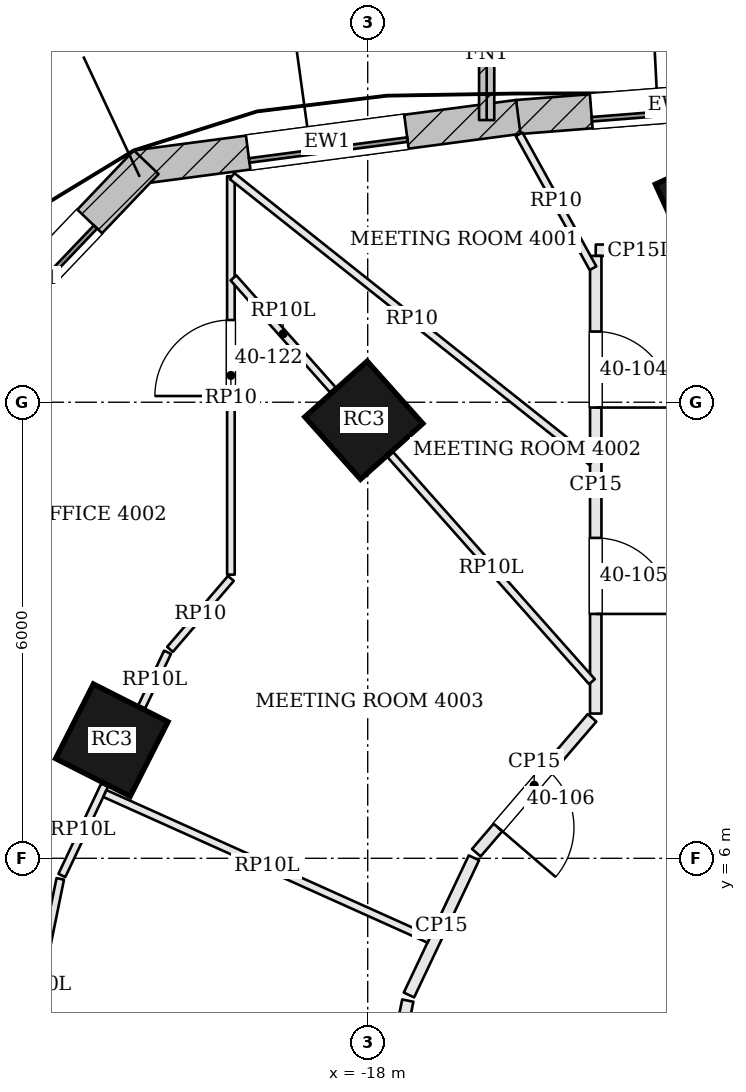
"""IFC4 building model, lengths in metres.
Left out: names, types, materials, properties, quantities, classifications, styles, units other than length and angle.
Written with IfcOpenShell. Run it as: python <this file> out.ifc"""

import sys

from ifc_helpers import new_model, si_unit, direction, frame, frame_2d, origin, origin_2d, place, context, subcontext, project, spatial, rectangle, extrude, element, fill, save


model = new_model("IFC4")
c1 = context("Model", 3, precision=1e-05, world=origin(), true_north=direction((0.0, 1.0)))
c2 = subcontext(c1, "Body", "Model", "MODEL_VIEW")
j1 = project(units=[si_unit("LENGTHUNIT", "METRE"), si_unit("PLANEANGLEUNIT", "RADIAN")], contexts=[c1])
p1 = place(None, origin())
s1 = spatial("IfcSite", under=j1, at=p1, CompositionType="ELEMENT")
p2 = place(p1, origin())
s2 = spatial("IfcBuilding", under=s1, at=p2, CompositionType="ELEMENT")
p3 = place(p2, frame((0.0, 0.0, 165.6)))
s3 = spatial("IfcBuildingStorey", under=s2, at=p3, CompositionType="ELEMENT", Elevation=165.6)
for number, where, z_axis, x_axis in (
    (1, (-13.487, 14.596, 0.0), (0.0, 0.0, 1.0), (-0.91, -0.415, 0.0)),
    (2, (-18.051, 11.763, 0.0), (0.0, 0.0, 1.0), (-0.746, -0.666, 0.0)),
    (3, (-21.367, 7.554, 0.0), (0.0, 0.0, 1.0), (-0.452, -0.892, 0.0)),
):
    element("IfcColumn", number, at=place(p3, frame(where, z_axis=z_axis, x_axis=x_axis)), inside=s3, PredefinedType="COLUMN", context=c2, shape_type="SweptSolid", body=[
        extrude(rectangle(XDim=1.1, YDim=1.1, at=origin_2d()), origin(), (0.0, 0.0, 1.0), 3.1),
    ])
p4 = place(p3, frame((-11.995, 16.067, 0.0), z_axis=(0.0, 0.0, 1.0), x_axis=(-0.996967993416, -0.077812724559, 0.0)))
e4 = element("IfcWall", 4, at=p4, inside=s3, PredefinedType="SOLIDWALL", context=c2, shape_type="SweptSolid", body=[
    extrude(rectangle(XDim=4.047, YDim=0.45, at=frame_2d((2.024, 0.0))), origin(), (0.0, 0.0, 1.0), 3.6),
])
p5 = place(p4, frame((0.974, 0.0, 0.9)))
e5 = element("IfcOpeningElement", 5, at=p5, cuts=e4, PredefinedType="OPENING", context=c2, shape_type="SweptSolid", body=[
    extrude(rectangle(XDim=2.1, YDim=1.8, at=frame_2d((1.05, 0.9))), frame((0.0, 0.235, 0.0), z_axis=(0.0, -1.0, 0.0), x_axis=(1.0, 0.0, 0.0)), (0.0, 0.0, 1.0), 0.47),
])
p6 = place(p3, frame((-16.019, 15.753, 0.0), z_axis=(0.0, 0.0, 1.0), x_axis=(-0.991409967396, -0.130790965086, 0.0)))
e6 = element("IfcWall", 6, at=p6, inside=s3, PredefinedType="SOLIDWALL", context=c2, shape_type="SweptSolid", body=[
    extrude(rectangle(XDim=5.068, YDim=0.45, at=frame_2d((2.534, 0.0))), origin(), (0.0, 0.0, 1.0), 3.6),
])
p7 = place(p6, frame((1.484, 0.0, 0.9)))
e7 = element("IfcOpeningElement", 7, at=p7, cuts=e6, PredefinedType="OPENING", context=c2, shape_type="SweptSolid", body=[
    extrude(rectangle(XDim=2.1, YDim=1.8, at=frame_2d((1.05, 0.9))), frame((0.0, 0.235, 0.0), z_axis=(0.0, -1.0, 0.0), x_axis=(1.0, 0.0, 0.0)), (0.0, 0.0, 1.0), 0.47),
])
p8 = place(p3, frame((-20.914, 15.158, 0.0), z_axis=(0.0, 0.0, 1.0), x_axis=(-0.690057851873, -0.723754213161, 0.0)))
e8 = element("IfcWall", 8, at=p8, inside=s3, PredefinedType="SOLIDWALL", context=c2, shape_type="SweptSolid", body=[
    extrude(rectangle(XDim=4.253, YDim=0.45, at=frame_2d((2.126, 0.0))), origin(), (0.0, 0.0, 1.0), 3.6),
])
p9 = place(p8, frame((1.076, 0.0, 0.9)))
e9 = element("IfcOpeningElement", 9, at=p9, cuts=e8, PredefinedType="OPENING", context=c2, shape_type="SweptSolid", body=[
    extrude(rectangle(XDim=2.1, YDim=1.8, at=frame_2d((1.05, 0.9))), frame((0.0, 0.235, 0.0), z_axis=(0.0, -1.0, 0.0), x_axis=(1.0, 0.0, 0.0)), (0.0, 0.0, 1.0), 0.47),
])
p10 = place(p3, frame((-16.435, 15.712, 0.0), z_axis=(0.0, 0.0, 1.0), x_axis=(0.000279017846, 0.999999961075, 0.0)))
e10 = element("IfcWall", 10, at=p10, inside=s3, PredefinedType="SOLIDWALL", context=c2, shape_type="SweptSolid", body=[
    extrude(rectangle(XDim=1.75, YDim=0.2, at=frame_2d((0.875, 0.0))), origin(), (0.0, 0.0, 1.0), 3.6),
])
p11 = place(p3, frame((-13.838, 13.992, 0.0), z_axis=(0.0, 0.0, 1.0), x_axis=(-0.999977403492, 0.006722537166, 0.0)))
e11 = element("IfcWall", 11, at=p11, inside=s3, PredefinedType="PARTITIONING", context=c2, shape_type="SweptSolid", body=[
    extrude(rectangle(XDim=1.162, YDim=0.15, at=frame_2d((0.581, 0.0))), origin(), (0.0, 0.0, 1.0), 2.58),
])
p12 = place(p3, frame((-15.0, 13.925, 0.0), z_axis=(0.0, 0.0, 1.0), x_axis=(0.0, -1.0, 0.0)))
e12 = element("IfcWall", 12, at=p12, inside=s3, PredefinedType="PARTITIONING", context=c2, shape_type="SweptSolid", body=[
    extrude(rectangle(XDim=6.021, YDim=0.15, at=frame_2d((3.01, 0.0))), origin(), (0.0, 0.0, 1.0), 3.098),
])
p13 = place(p12, frame((0.995, 0.0, 0.0)))
e13 = element("IfcOpeningElement", 13, at=p13, cuts=e12, PredefinedType="OPENING", context=c2, shape_type="SweptSolid", body=[
    extrude(rectangle(XDim=1.0, YDim=2.4, at=frame_2d((0.5, 1.2))), frame((0.0, 0.085, 0.0), z_axis=(0.0, -1.0, 0.0), x_axis=(1.0, 0.0, 0.0)), (0.0, 0.0, 1.0), 0.17),
])
p14 = place(p12, frame((3.71, 0.0, 0.0)))
e14 = element("IfcOpeningElement", 14, at=p14, cuts=e12, PredefinedType="OPENING", context=c2, shape_type="SweptSolid", body=[
    extrude(rectangle(XDim=1.0, YDim=2.4, at=frame_2d((0.5, 1.2))), frame((0.0, 0.085, 0.0), z_axis=(0.0, -1.0, 0.0), x_axis=(1.0, 0.0, 0.0)), (0.0, 0.0, 1.0), 0.17),
])
p15 = place(p3, frame((-15.049, 7.847, 0.0), z_axis=(0.0, 0.0, 1.0), x_axis=(-0.651264357687, -0.758850931611, 0.0)))
e15 = element("IfcWall", 15, at=p15, inside=s3, PredefinedType="PARTITIONING", context=c2, shape_type="SweptSolid", body=[
    extrude(rectangle(XDim=2.337, YDim=0.15, at=frame_2d((1.169, 0.0))), origin(), (0.0, 0.0, 1.0), 3.098),
])
p16 = place(p15, frame((0.9, 0.0, 0.0)))
e16 = element("IfcOpeningElement", 16, at=p16, cuts=e15, PredefinedType="OPENING", context=c2, shape_type="SweptSolid", body=[
    extrude(rectangle(XDim=1.0, YDim=2.4, at=frame_2d((0.5, 1.2))), frame((0.0, 0.085, 0.0), z_axis=(0.0, -1.0, 0.0), x_axis=(1.0, 0.0, 0.0)), (0.0, 0.0, 1.0), 0.17),
])
p17 = place(p3, frame((-16.603, 6.006, 0.0), z_axis=(0.0, 0.0, 1.0), x_axis=(-0.427839289523, -0.903854823708, 0.0)))
e17 = element("IfcWall", 17, at=p17, inside=s3, PredefinedType="PARTITIONING", context=c2, shape_type="SweptSolid", body=[
    extrude(rectangle(XDim=1.997, YDim=0.15, at=frame_2d((0.998, 0.0))), origin(), (0.0, 0.0, 1.0), 3.098),
])
p18 = place(p3, frame((-17.472, 4.128, 0.0), z_axis=(0.0, 0.0, 1.0), x_axis=(-0.199502025364, -0.979897413955, 0.0)))
e18 = element("IfcWall", 18, at=p18, inside=s3, PredefinedType="PARTITIONING", context=c2, shape_type="SweptSolid", body=[
    extrude(rectangle(XDim=2.246, YDim=0.15, at=frame_2d((1.123, 0.0))), origin(), (0.0, 0.0, 1.0), 3.098),
])
p19 = place(p18, frame((0.8, 0.0, 0.0)))
e19 = element("IfcOpeningElement", 19, at=p19, cuts=e18, PredefinedType="OPENING", context=c2, shape_type="SweptSolid", body=[
    extrude(rectangle(XDim=1.0, YDim=2.4, at=frame_2d((0.5, 1.2))), frame((0.0, 0.085, 0.0), z_axis=(0.0, -1.0, 0.0), x_axis=(1.0, 0.0, 0.0)), (0.0, 0.0, 1.0), 0.17),
])
p20 = place(p3, frame((-22.613, 2.939, 0.0), z_axis=(0.0, 0.0, 1.0), x_axis=(0.19944591803, 0.979908835444, 0.0)))
e20 = element("IfcWall", 20, at=p20, inside=s3, PredefinedType="PARTITIONING", context=c2, shape_type="SweptSolid", body=[
    extrude(rectangle(XDim=2.847, YDim=0.1, at=frame_2d((1.424, 0.0))), origin(), (0.0, 0.0, 1.0), 2.58),
])
p21 = place(p3, frame((-22.024, 5.774, 0.0), z_axis=(0.0, 0.0, 1.0), x_axis=(0.427870793862, 0.903839910471, 0.0)))
e21 = element("IfcWall", 21, at=p21, inside=s3, PredefinedType="PARTITIONING", context=c2, shape_type="SweptSolid", body=[
    extrude(rectangle(XDim=1.315, YDim=0.1, at=frame_2d((0.657, 0.0))), origin(), (0.0, 0.0, 1.0), 2.58),
])
p22 = place(p3, frame((-20.973, 7.993, 0.0), z_axis=(0.0, 0.0, 1.0), x_axis=(0.427914425671, 0.903819254222, 0.0)))
e22 = element("IfcWall", 22, at=p22, inside=s3, PredefinedType="PARTITIONING", context=c2, shape_type="SweptSolid", body=[
    extrude(rectangle(XDim=0.794, YDim=0.1, at=frame_2d((0.397, 0.0))), origin(), (0.0, 0.0, 1.0), 2.58),
])
p23 = place(p3, frame((-20.601, 8.749, 0.0), z_axis=(0.0, 0.0, 1.0), x_axis=(0.651150974932, 0.758948224746, 0.0)))
e23 = element("IfcWall", 23, at=p23, inside=s3, PredefinedType="PARTITIONING", context=c2, shape_type="SweptSolid", body=[
    extrude(rectangle(XDim=1.23, YDim=0.1, at=frame_2d((0.615, 0.0))), origin(), (0.0, 0.0, 1.0), 3.084),
])
p24 = place(p3, frame((-19.8, 9.732, 0.0), z_axis=(0.0, 0.0, 1.0), x_axis=(0.0, 1.0, 0.0)))
e24 = element("IfcWall", 24, at=p24, inside=s3, PredefinedType="PARTITIONING", context=c2, shape_type="SweptSolid", body=[
    extrude(rectangle(XDim=5.241, YDim=0.1, at=frame_2d((2.621, 0.0))), origin(), (0.0, 0.0, 1.0), 3.084),
])
p25 = place(p24, frame((2.35, 0.0, 0.0)))
e25 = element("IfcOpeningElement", 25, at=p25, cuts=e24, PredefinedType="OPENING", context=c2, shape_type="SweptSolid", body=[
    extrude(rectangle(XDim=1.0, YDim=2.4, at=frame_2d((0.5, 1.2))), frame((0.0, 0.06, 0.0), z_axis=(0.0, -1.0, 0.0), x_axis=(1.0, 0.0, 0.0)), (0.0, 0.0, 1.0), 0.12),
])
p26 = place(p3, frame((-15.036, 13.763, 0.0), z_axis=(0.0, 0.0, 1.0), x_axis=(-0.483404650684, 0.875397020613, 0.0)))
e26 = element("IfcWall", 26, at=p26, inside=s3, PredefinedType="PARTITIONING", context=c2, shape_type="SweptSolid", body=[
    extrude(rectangle(XDim=2.011, YDim=0.1, at=frame_2d((1.005, 0.0))), origin(), (0.0, 0.0, 1.0), 3.084),
])
p27 = place(p3, frame((-15.052, 11.216, 0.0), z_axis=(0.0, 0.0, 1.0), x_axis=(-0.782929703911, 0.622110182149, 0.0)))
e27 = element("IfcWall", 27, at=p27, inside=s3, PredefinedType="PARTITIONING", context=c2, shape_type="SweptSolid", body=[
    extrude(rectangle(XDim=6.043, YDim=0.1, at=frame_2d((3.022, 0.0))), origin(), (0.0, 0.0, 1.0), 3.084),
])
p28 = place(p3, frame((-15.05, 8.324, 0.0), z_axis=(0.0, 0.0, 1.0), x_axis=(-0.663995746483, 0.747736349694, 0.0)))
e28 = element("IfcWall", 28, at=p28, inside=s3, PredefinedType="PARTITIONING", context=c2, shape_type="SweptSolid", body=[
    extrude(rectangle(XDim=3.994, YDim=0.1, at=frame_2d((1.997, 0.0))), origin(), (0.0, 0.0, 1.0), 2.58),
])
p29 = place(p3, frame((-18.459, 12.163, 0.0), z_axis=(0.0, 0.0, 1.0), x_axis=(-0.664040692512, 0.74769643485, 0.0)))
e29 = element("IfcWall", 29, at=p29, inside=s3, PredefinedType="PARTITIONING", context=c2, shape_type="SweptSolid", body=[
    extrude(rectangle(XDim=1.97, YDim=0.1, at=frame_2d((0.985, 0.0))), origin(), (0.0, 0.0, 1.0), 2.58),
])
p30 = place(p3, frame((-17.193, 4.936, 0.0), z_axis=(0.0, 0.0, 1.0), x_axis=(-0.912146065202, 0.409865289744, 0.0)))
e30 = element("IfcWall", 30, at=p30, inside=s3, PredefinedType="PARTITIONING", context=c2, shape_type="SweptSolid", body=[
    extrude(rectangle(XDim=4.676, YDim=0.1, at=frame_2d((2.338, 0.0))), origin(), (0.0, 0.0, 1.0), 2.58),
])
p31 = place(p5, origin())
e31 = element("IfcWindow", 31, at=p31, inside=s3, PartitioningType="SINGLE_PANEL", PredefinedType="WINDOW", context=c2, shape_type="SweptSolid", body=[
    extrude(rectangle(XDim=2.1, YDim=1.8, at=frame_2d((1.05, 0.9))), frame((0.0, 0.135, 0.0), z_axis=(0.0, -1.0, 0.0), x_axis=(1.0, 0.0, 0.0)), (0.0, 0.0, 1.0), 0.06),
])
fill(e5, e31)
p32 = place(p7, origin())
e32 = element("IfcWindow", 32, at=p32, inside=s3, PartitioningType="SINGLE_PANEL", PredefinedType="WINDOW", context=c2, shape_type="SweptSolid", body=[
    extrude(rectangle(XDim=2.1, YDim=1.8, at=frame_2d((1.05, 0.9))), frame((0.0, 0.135, 0.0), z_axis=(0.0, -1.0, 0.0), x_axis=(1.0, 0.0, 0.0)), (0.0, 0.0, 1.0), 0.06),
])
fill(e7, e32)
p33 = place(p9, origin())
e33 = element("IfcWindow", 33, at=p33, inside=s3, PartitioningType="SINGLE_PANEL", PredefinedType="WINDOW", context=c2, shape_type="SweptSolid", body=[
    extrude(rectangle(XDim=2.1, YDim=1.8, at=frame_2d((1.05, 0.9))), frame((0.0, 0.135, 0.0), z_axis=(0.0, -1.0, 0.0), x_axis=(1.0, 0.0, 0.0)), (0.0, 0.0, 1.0), 0.06),
])
fill(e9, e33)
p34 = place(p13, origin())
e34 = element("IfcDoor", 34, at=p34, inside=s3, OperationType="SINGLE_SWING_RIGHT", PredefinedType="DOOR", context=c2, shape_type="SweptSolid", body=[
    extrude(rectangle(XDim=1.0, YDim=2.4, at=frame_2d((0.5, 1.2))), frame((0.0, 0.025, 0.0), z_axis=(0.0, -1.0, 0.0), x_axis=(1.0, 0.0, 0.0)), (0.0, 0.0, 1.0), 0.05),
])
fill(e13, e34)
p35 = place(p14, origin())
e35 = element("IfcDoor", 35, at=p35, inside=s3, OperationType="SINGLE_SWING_RIGHT", PredefinedType="DOOR", context=c2, shape_type="SweptSolid", body=[
    extrude(rectangle(XDim=1.0, YDim=2.4, at=frame_2d((0.5, 1.2))), frame((0.0, 0.025, 0.0), z_axis=(0.0, -1.0, 0.0), x_axis=(1.0, 0.0, 0.0)), (0.0, 0.0, 1.0), 0.05),
])
fill(e14, e35)
p36 = place(p16, origin())
e36 = element("IfcDoor", 36, at=p36, inside=s3, OperationType="SINGLE_SWING_RIGHT", PredefinedType="DOOR", context=c2, shape_type="SweptSolid", body=[
    extrude(rectangle(XDim=1.0, YDim=2.4, at=frame_2d((0.5, 1.2))), frame((0.0, 0.025, 0.0), z_axis=(0.0, -1.0, 0.0), x_axis=(1.0, 0.0, 0.0)), (0.0, 0.0, 1.0), 0.05),
])
fill(e16, e36)
p37 = place(p25, origin())
e37 = element("IfcDoor", 37, at=p37, inside=s3, OperationType="SINGLE_SWING_LEFT", PredefinedType="DOOR", context=c2, shape_type="SweptSolid", body=[
    extrude(rectangle(XDim=1.0, YDim=2.4, at=frame_2d((0.5, 1.2))), frame((0.0, 0.025, 0.0), z_axis=(0.0, -1.0, 0.0), x_axis=(1.0, 0.0, 0.0)), (0.0, 0.0, 1.0), 0.05),
])
fill(e25, e37)
save(model, sys.argv[1])
